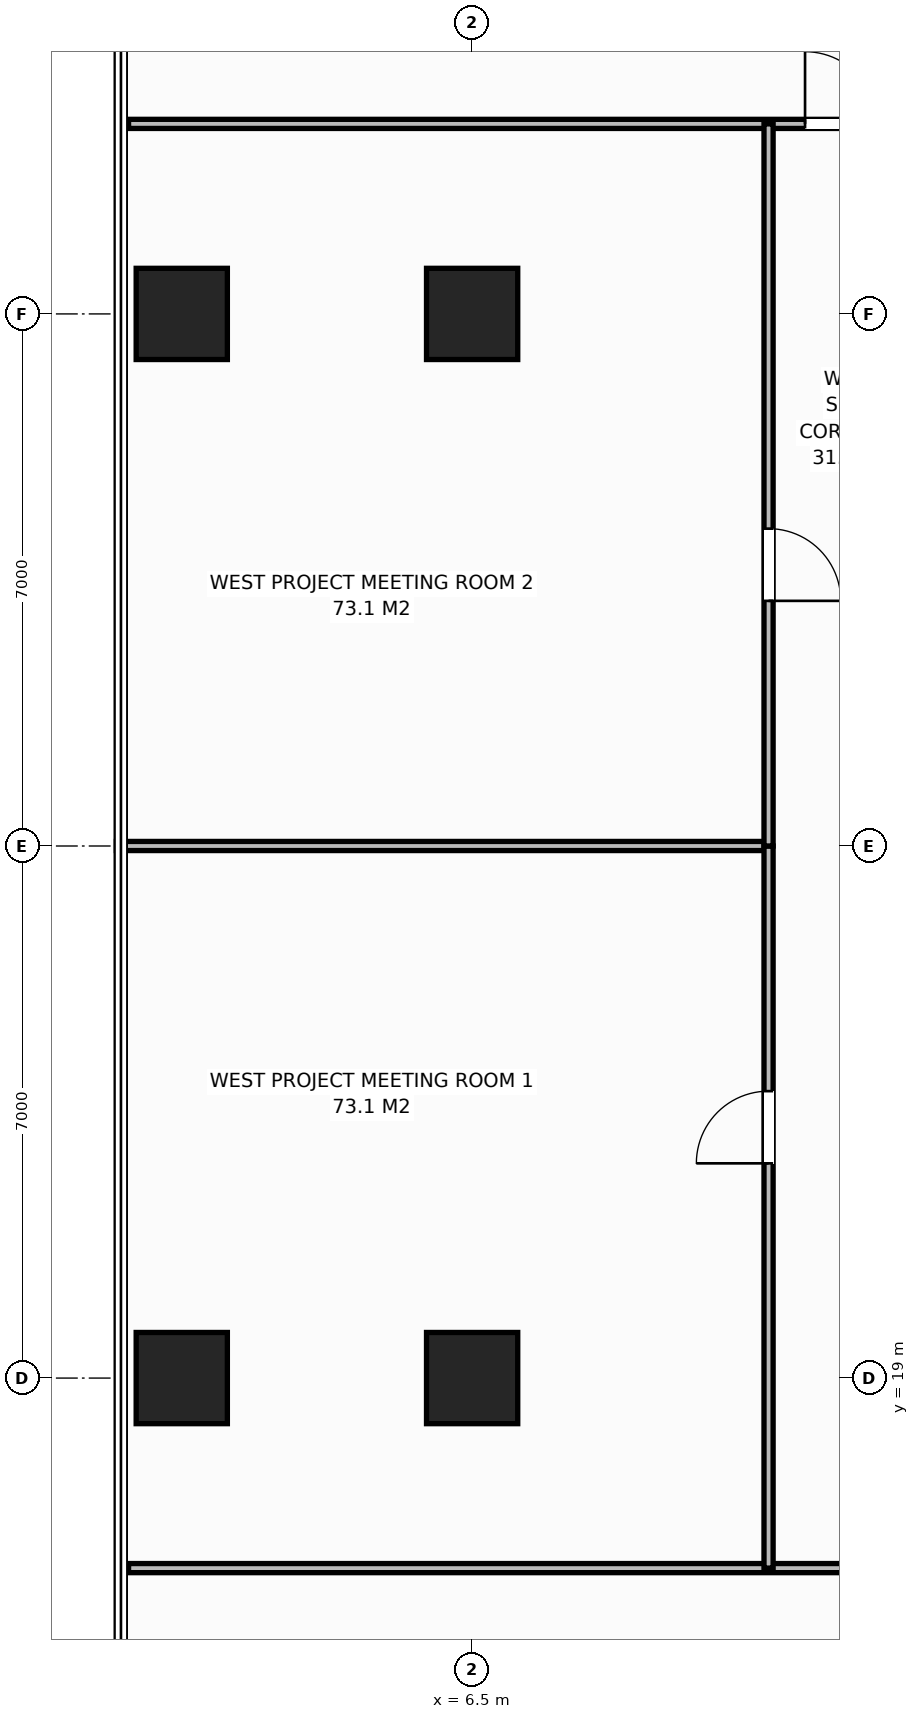
"""IFC4 building model, lengths in metres.
Left out: names, types, materials, properties, quantities, classifications, styles, units other than length and angle.
Written with IfcOpenShell. Run it as: python <this file> out.ifc"""

import sys

from ifc_helpers import new_model, si_unit, direction, frame, frame_2d, origin, origin_2d, place, context, subcontext, project, spatial, rectangle, extrude, element, fill, save


model = new_model("IFC4")
c1 = context("Model", 3, precision=1e-05, world=origin(), true_north=direction((0.0, 1.0)))
c2 = subcontext(c1, "Body", "Model", "MODEL_VIEW")
j1 = project(units=[si_unit("LENGTHUNIT", "METRE"), si_unit("PLANEANGLEUNIT", "RADIAN")], contexts=[c1])
p1 = place(None, origin())
s1 = spatial("IfcSite", under=j1, at=p1, CompositionType="ELEMENT")
p2 = place(p1, origin())
s2 = spatial("IfcBuilding", under=s1, at=p2, CompositionType="ELEMENT")
p3 = place(p2, frame((0.0, 0.0, 112.6)))
s3 = spatial("IfcBuildingStorey", under=s2, at=p3, CompositionType="ELEMENT", Elevation=112.6)
for number, where, z_axis, x_axis in (
    (1, (6.5, 19.0, 0.0), (0.0, 0.0, 1.0), (1.0, 0.0, 0.0)),
    (2, (6.5, 33.0, 0.0), (0.0, 0.0, 1.0), (1.0, 0.0, 0.0)),
    (3, (2.68, 19.0, 0.0), (0.0, 0.0, 1.0), (1.0, 0.0, 0.0)),
    (4, (2.68, 33.0, 0.0), (0.0, 0.0, 1.0), (1.0, 0.0, 0.0)),
):
    element("IfcColumn", number, at=place(p3, frame(where, z_axis=z_axis, x_axis=x_axis)), inside=s3, PredefinedType="COLUMN", context=c2, shape_type="SweptSolid", body=[
        extrude(rectangle(XDim=1.2, YDim=1.2, at=origin_2d()), origin(), (0.0, 0.0, 1.0), 3.8),
    ])
p4 = place(p3, frame((1.98, 35.5, 0.0), z_axis=(0.0, 0.0, 1.0), x_axis=(1.0, 0.0, 0.0)))
e5 = element("IfcWall", 5, at=p4, inside=s3, PredefinedType="PARTITIONING", context=c2, shape_type="SweptSolid", body=[
    extrude(rectangle(XDim=11.16, YDim=0.12, at=frame_2d((5.58, 0.0))), origin(), (0.0, 0.0, 1.0), 3.565),
])
p5 = place(p4, frame((8.9, 0.0, 0.0)))
e6 = element("IfcOpeningElement", 6, at=p5, cuts=e5, PredefinedType="OPENING", context=c2, shape_type="SweptSolid", body=[
    extrude(rectangle(XDim=0.95, YDim=2.15, at=frame_2d((0.475, 1.075))), frame((0.0, 0.07, 0.0), z_axis=(0.0, -1.0, 0.0), x_axis=(1.0, 0.0, 0.0)), (0.0, 0.0, 1.0), 0.14),
])
p6 = place(p3, frame((1.98, 16.5, 0.0), z_axis=(0.0, 0.0, 1.0), x_axis=(1.0, 0.0, 0.0)))
e7 = element("IfcWall", 7, at=p6, inside=s3, PredefinedType="PARTITIONING", context=c2, shape_type="SweptSolid", body=[
    extrude(rectangle(XDim=18.391, YDim=0.12, at=frame_2d((9.195, 0.0))), origin(), (0.0, 0.0, 1.0), 3.565),
])
p7 = place(p6, frame((12.93, 0.0, 0.0)))
e8 = element("IfcOpeningElement", 8, at=p7, cuts=e7, PredefinedType="OPENING", context=c2, shape_type="SweptSolid", body=[
    extrude(rectangle(XDim=0.95, YDim=2.15, at=frame_2d((0.475, 1.075))), frame((0.0, 0.07, 0.0), z_axis=(0.0, -1.0, 0.0), x_axis=(1.0, 0.0, 0.0)), (0.0, 0.0, 1.0), 0.14),
])
p8 = place(p3, frame((1.82, 26.0, 0.0), z_axis=(0.0, 0.0, 1.0), x_axis=(1.0, 0.0, 0.0)))
e9 = element("IfcWall", 9, at=p8, inside=s3, PredefinedType="PARTITIONING", context=c2, shape_type="SweptSolid", body=[
    extrude(rectangle(XDim=8.58, YDim=0.12, at=frame_2d((4.29, 0.0))), origin(), (0.0, 0.0, 1.0), 3.565),
])
p9 = place(p3, frame((10.4, 16.5, 0.0), z_axis=(0.0, 0.0, 1.0), x_axis=(0.0, 1.0, 0.0)))
e10 = element("IfcWall", 10, at=p9, inside=s3, PredefinedType="PARTITIONING", context=c2, shape_type="SweptSolid", body=[
    extrude(rectangle(XDim=9.5, YDim=0.12, at=frame_2d((4.75, 0.0))), origin(), (0.0, 0.0, 1.0), 3.565),
])
p10 = place(p9, frame((5.325, 0.0, 0.0)))
e11 = element("IfcOpeningElement", 11, at=p10, cuts=e10, PredefinedType="OPENING", context=c2, shape_type="SweptSolid", body=[
    extrude(rectangle(XDim=0.95, YDim=2.15, at=frame_2d((0.475, 1.075))), frame((0.0, 0.07, 0.0), z_axis=(0.0, -1.0, 0.0), x_axis=(1.0, 0.0, 0.0)), (0.0, 0.0, 1.0), 0.14),
])
p11 = place(p3, frame((10.4, 26.0, 0.0), z_axis=(0.0, 0.0, 1.0), x_axis=(0.0, 1.0, 0.0)))
e12 = element("IfcWall", 12, at=p11, inside=s3, PredefinedType="PARTITIONING", context=c2, shape_type="SweptSolid", body=[
    extrude(rectangle(XDim=9.5, YDim=0.12, at=frame_2d((4.75, 0.0))), origin(), (0.0, 0.0, 1.0), 3.565),
])
p12 = place(p11, frame((3.225, 0.0, 0.0)))
e13 = element("IfcOpeningElement", 13, at=p12, cuts=e12, PredefinedType="OPENING", context=c2, shape_type="SweptSolid", body=[
    extrude(rectangle(XDim=0.95, YDim=2.15, at=frame_2d((0.475, 1.075))), frame((0.0, 0.07, 0.0), z_axis=(0.0, -1.0, 0.0), x_axis=(1.0, 0.0, 0.0)), (0.0, 0.0, 1.0), 0.14),
])
p13 = place(p5, origin())
e14 = element("IfcDoor", 14, at=p13, inside=s3, OperationType="SINGLE_SWING_LEFT", PredefinedType="DOOR", context=c2, shape_type="SweptSolid", body=[
    extrude(rectangle(XDim=0.95, YDim=2.15, at=frame_2d((0.475, 1.075))), frame((0.0, 0.025, 0.0), z_axis=(0.0, -1.0, 0.0), x_axis=(1.0, 0.0, 0.0)), (0.0, 0.0, 1.0), 0.05),
])
fill(e6, e14)
p14 = place(p10, origin())
e15 = element("IfcDoor", 15, at=p14, inside=s3, OperationType="SINGLE_SWING_LEFT", PredefinedType="DOOR", context=c2, shape_type="SweptSolid", body=[
    extrude(rectangle(XDim=0.95, YDim=2.15, at=frame_2d((0.475, 1.075))), frame((0.0, 0.025, 0.0), z_axis=(0.0, -1.0, 0.0), x_axis=(1.0, 0.0, 0.0)), (0.0, 0.0, 1.0), 0.05),
])
fill(e11, e15)
p15 = place(p12, origin())
e16 = element("IfcDoor", 16, at=p15, inside=s3, OperationType="SINGLE_SWING_RIGHT", PredefinedType="DOOR", context=c2, shape_type="SweptSolid", body=[
    extrude(rectangle(XDim=0.95, YDim=2.15, at=frame_2d((0.475, 1.075))), frame((0.0, 0.025, 0.0), z_axis=(0.0, -1.0, 0.0), x_axis=(1.0, 0.0, 0.0)), (0.0, 0.0, 1.0), 0.05),
])
fill(e13, e16)
save(model, sys.argv[1])
